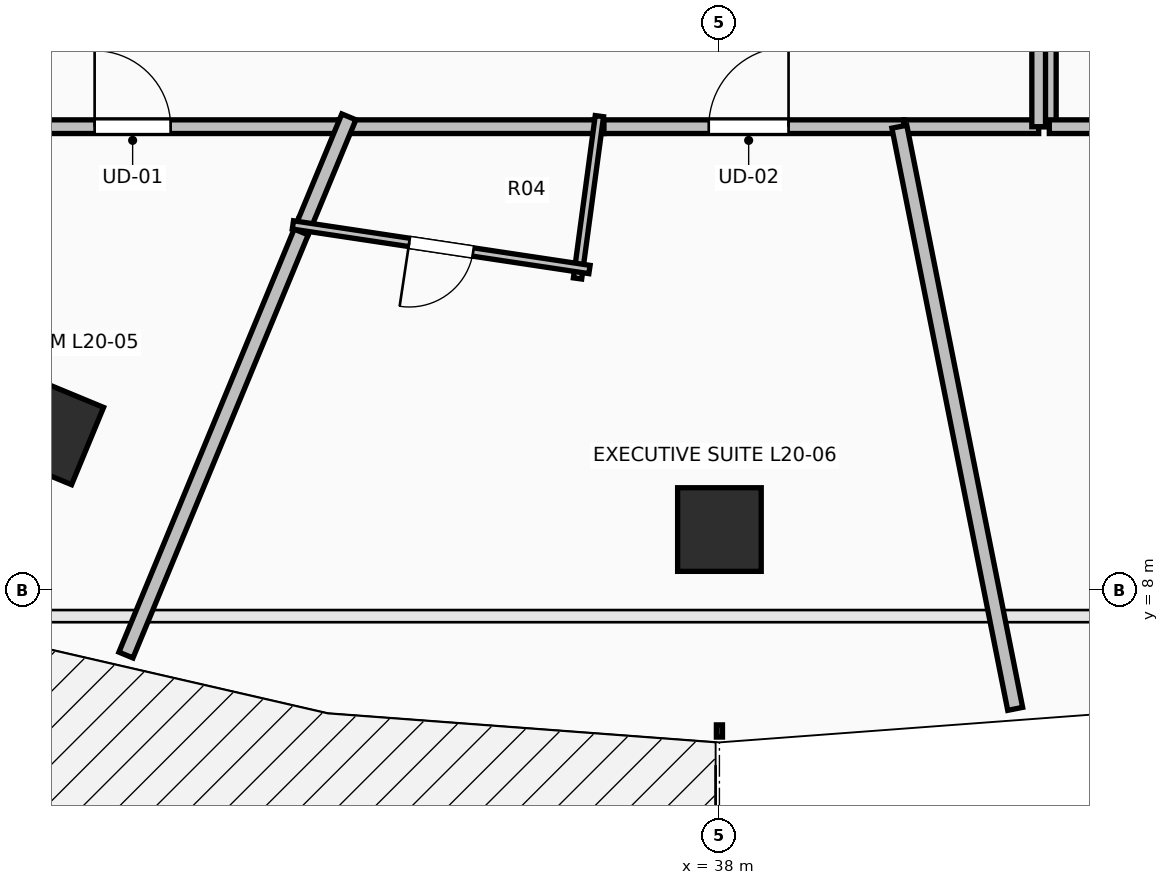
"""IFC4 building model, lengths in metres.
Left out: names, types, materials, properties, quantities, classifications, styles, units other than length and angle.
Written with IfcOpenShell. Run it as: python <this file> out.ifc"""

import sys

from ifc_helpers import new_model, si_unit, direction, frame, frame_2d, origin, origin_2d, place, context, subcontext, project, spatial, rectangle, extrude, element, fill, save


model = new_model("IFC4")
c1 = context("Model", 3, precision=1e-05, world=origin(), true_north=direction((0.0, 1.0)))
c2 = subcontext(c1, "Body", "Model", "MODEL_VIEW")
j1 = project(units=[si_unit("LENGTHUNIT", "METRE"), si_unit("PLANEANGLEUNIT", "RADIAN")], contexts=[c1])
p1 = place(None, origin())
s1 = spatial("IfcSite", under=j1, at=p1, CompositionType="ELEMENT")
p2 = place(p1, origin())
s2 = spatial("IfcBuilding", under=s1, at=p2, CompositionType="ELEMENT")
p3 = place(p2, frame((0.0, 0.0, 78.8)))
s3 = spatial("IfcBuildingStorey", under=s2, at=p3, CompositionType="ELEMENT", Elevation=78.8)
for number, where, z_axis, x_axis in (
    (1, (29.179, 10.109, 0.0), (0.0, 0.0, 1.0), (-0.383, -0.924, 0.0)),
    (2, (38.0, 8.8, 0.0), (0.0, 0.0, 1.0), (0.0, -1.0, 0.0)),
):
    element("IfcColumn", number, at=place(p3, frame(where, z_axis=z_axis, x_axis=x_axis)), inside=s3, PredefinedType="COLUMN", context=c2, shape_type="SweptSolid", body=[
        extrude(rectangle(XDim=1.1, YDim=1.1, at=origin_2d()), origin(), (0.0, 0.0, 1.0), 3.5),
    ])
p4 = place(p3, frame((27.429, 14.1, 0.0), z_axis=(0.0, 0.0, 1.0), x_axis=(1.0, 0.0, 0.0)))
e3 = element("IfcWall", 3, at=p4, inside=s3, PredefinedType="PARTITIONING", context=c2, shape_type="SweptSolid", body=[
    extrude(rectangle(XDim=5.702, YDim=0.18, at=frame_2d((2.851, 0.0))), origin(), (0.0, 0.0, 1.0), 2.432),
])
p5 = place(p4, frame((2.351, 0.0, 0.0)))
e4 = element("IfcOpeningElement", 4, at=p5, cuts=e3, PredefinedType="OPENING", context=c2, shape_type="SweptSolid", body=[
    extrude(rectangle(XDim=1.0, YDim=2.15, at=frame_2d((0.5, 1.075))), frame((0.0, 0.105, 0.0), z_axis=(0.0, -1.0, 0.0), x_axis=(1.0, 0.0, 0.0)), (0.0, 0.0, 1.0), 0.21),
])
p6 = place(p3, frame((36.341, 14.1, 0.0), z_axis=(0.0, 0.0, 1.0), x_axis=(1.0, 0.0, 0.0)))
e5 = element("IfcWall", 5, at=p6, inside=s3, PredefinedType="PARTITIONING", context=c2, shape_type="SweptSolid", body=[
    extrude(rectangle(XDim=4.087, YDim=0.18, at=frame_2d((2.043, 0.0))), origin(), (0.0, 0.0, 1.0), 2.922),
])
p7 = place(p6, frame((1.519, 0.0, 0.0)))
e6 = element("IfcOpeningElement", 6, at=p7, cuts=e5, PredefinedType="OPENING", context=c2, shape_type="SweptSolid", body=[
    extrude(rectangle(XDim=1.05, YDim=2.2, at=frame_2d((0.525, 1.1))), frame((0.0, 0.105, 0.0), z_axis=(0.0, -1.0, 0.0), x_axis=(1.0, 0.0, 0.0)), (0.0, 0.0, 1.0), 0.21),
])
p8 = place(p3, frame((32.991, 14.1, 0.0), z_axis=(0.0, 0.0, 1.0), x_axis=(1.0, 0.0, 0.0)))
e7 = element("IfcWall", 7, at=p8, inside=s3, PredefinedType="PARTITIONING", context=c2, shape_type="SweptSolid", body=[
    extrude(rectangle(XDim=3.49, YDim=0.18, at=frame_2d((1.745, 0.0))), origin(), (0.0, 0.0, 1.0), 2.922),
])
p9 = place(p3, frame((42.34, 16.24, 0.0), z_axis=(0.0, 0.0, 1.0), x_axis=(0.0, -1.0, 0.0)))
e8 = element("IfcWall", 8, at=p9, inside=s3, PredefinedType="PARTITIONING", context=c2, shape_type="SweptSolid", body=[
    extrude(rectangle(XDim=2.14, YDim=0.18, at=frame_2d((1.07, 0.0))), origin(), (0.0, 0.0, 1.0), 2.922),
])
p10 = place(p3, frame((42.34, 14.1, 0.0), z_axis=(0.0, 0.0, 1.0), x_axis=(1.0, 0.0, 0.0)))
e9 = element("IfcWall", 9, at=p10, inside=s3, PredefinedType="PARTITIONING", context=c2, shape_type="SweptSolid", body=[
    extrude(rectangle(XDim=8.41, YDim=0.18, at=frame_2d((4.205, 0.0))), origin(), (0.0, 0.0, 1.0), 2.432),
])
p11 = place(p10, frame((3.705, 0.0, 0.0)))
e10 = element("IfcOpeningElement", 10, at=p11, cuts=e9, PredefinedType="OPENING", context=c2, shape_type="SweptSolid", body=[
    extrude(rectangle(XDim=1.0, YDim=2.15, at=frame_2d((0.5, 1.075))), frame((0.0, 0.105, 0.0), z_axis=(0.0, -1.0, 0.0), x_axis=(1.0, 0.0, 0.0)), (0.0, 0.0, 1.0), 0.21),
])
p12 = place(p3, frame((40.428, 14.1, 0.0), z_axis=(0.0, 0.0, 1.0), x_axis=(1.0, 0.0, 0.0)))
e11 = element("IfcWall", 11, at=p12, inside=s3, PredefinedType="PARTITIONING", context=c2, shape_type="SweptSolid", body=[
    extrude(rectangle(XDim=1.772, YDim=0.18, at=frame_2d((0.886, 0.0))), origin(), (0.0, 0.0, 1.0), 2.922),
])
p13 = place(p3, frame((42.2, 14.1, 0.0), z_axis=(0.0, 0.0, 1.0), x_axis=(0.0, 1.0, 0.0)))
e12 = element("IfcWall", 12, at=p13, inside=s3, PredefinedType="PARTITIONING", context=c2, shape_type="SweptSolid", body=[
    extrude(rectangle(XDim=2.14, YDim=0.18, at=frame_2d((1.07, 0.0))), origin(), (0.0, 0.0, 1.0), 2.922),
])
p14 = place(p3, frame((30.192, 7.149, 0.0), z_axis=(0.0, 0.0, 1.0), x_axis=(0.382705075352, 0.923870567395, 0.0)))
e13 = element("IfcWall", 13, at=p14, inside=s3, PredefinedType="PARTITIONING", context=c2, shape_type="SweptSolid", body=[
    extrude(rectangle(XDim=6.164, YDim=0.2, at=frame_2d((3.082, 0.0))), origin(), (0.0, 0.0, 1.0), 2.677),
])
p15 = place(p3, frame((32.497, 12.715, 0.0), z_axis=(0.0, 0.0, 1.0), x_axis=(0.382891039503, 0.923793511489, 0.0)))
e14 = element("IfcWall", 14, at=p15, inside=s3, PredefinedType="PARTITIONING", context=c2, shape_type="SweptSolid", body=[
    extrude(rectangle(XDim=1.639, YDim=0.2, at=frame_2d((0.82, 0.0))), origin(), (0.0, 0.0, 1.0), 2.922),
])
p16 = place(p3, frame((36.421, 14.239, 0.0), z_axis=(0.0, 0.0, 1.0), x_axis=(-0.133358508544, -0.99106786256, 0.0)))
e15 = element("IfcWall", 15, at=p16, inside=s3, PredefinedType="PARTITIONING", context=c2, shape_type="SweptSolid", body=[
    extrude(rectangle(XDim=2.155, YDim=0.11, at=frame_2d((1.077, 0.0))), origin(), (0.0, 0.0, 1.0), 2.922),
])
p17 = place(p3, frame((36.29, 12.221, 0.0), z_axis=(0.0, 0.0, 1.0), x_axis=(-0.988883185792, 0.148694468147, 0.0)))
e16 = element("IfcWall", 16, at=p17, inside=s3, PredefinedType="PARTITIONING", context=c2, shape_type="SweptSolid", body=[
    extrude(rectangle(XDim=3.946, YDim=0.11, at=frame_2d((1.973, 0.0))), origin(), (0.0, 0.0, 1.0), 3.24),
])
p18 = place(p17, frame((1.548, 0.0, 0.0)))
e17 = element("IfcOpeningElement", 17, at=p18, cuts=e16, PredefinedType="OPENING", context=c2, shape_type="SweptSolid", body=[
    extrude(rectangle(XDim=0.85, YDim=2.1, at=frame_2d((0.425, 1.05))), frame((0.0, 0.07, 0.0), z_axis=(0.0, -1.0, 0.0), x_axis=(1.0, 0.0, 0.0)), (0.0, 0.0, 1.0), 0.14),
])
p19 = place(p3, frame((41.891, 6.441, 0.0), z_axis=(0.0, 0.0, 1.0), x_axis=(-0.195172155482, 0.980768999166, 0.0)))
e18 = element("IfcWall", 18, at=p19, inside=s3, PredefinedType="PARTITIONING", context=c2, shape_type="SweptSolid", body=[
    extrude(rectangle(XDim=7.809, YDim=0.2, at=frame_2d((3.905, 0.0))), origin(), (0.0, 0.0, 1.0), 2.432),
])
p20 = place(p5, origin())
e19 = element("IfcDoor", 19, at=p20, inside=s3, OperationType="SINGLE_SWING_LEFT", PredefinedType="DOOR", context=c2, shape_type="SweptSolid", body=[
    extrude(rectangle(XDim=1.0, YDim=2.15, at=frame_2d((0.5, 1.075))), frame((0.0, 0.025, 0.0), z_axis=(0.0, -1.0, 0.0), x_axis=(1.0, 0.0, 0.0)), (0.0, 0.0, 1.0), 0.05),
])
fill(e4, e19)
p21 = place(p7, origin())
e20 = element("IfcDoor", 20, at=p21, inside=s3, OperationType="SINGLE_SWING_RIGHT", PredefinedType="DOOR", context=c2, shape_type="SweptSolid", body=[
    extrude(rectangle(XDim=1.05, YDim=2.2, at=frame_2d((0.525, 1.1))), frame((0.0, 0.025, 0.0), z_axis=(0.0, -1.0, 0.0), x_axis=(1.0, 0.0, 0.0)), (0.0, 0.0, 1.0), 0.05),
])
fill(e6, e20)
p22 = place(p18, origin())
e21 = element("IfcDoor", 21, at=p22, inside=s3, OperationType="SINGLE_SWING_RIGHT", PredefinedType="DOOR", context=c2, shape_type="SweptSolid", body=[
    extrude(rectangle(XDim=0.85, YDim=2.1, at=frame_2d((0.425, 1.05))), frame((0.0, 0.025, 0.0), z_axis=(0.0, -1.0, 0.0), x_axis=(1.0, 0.0, 0.0)), (0.0, 0.0, 1.0), 0.05),
])
fill(e17, e21)
save(model, sys.argv[1])
